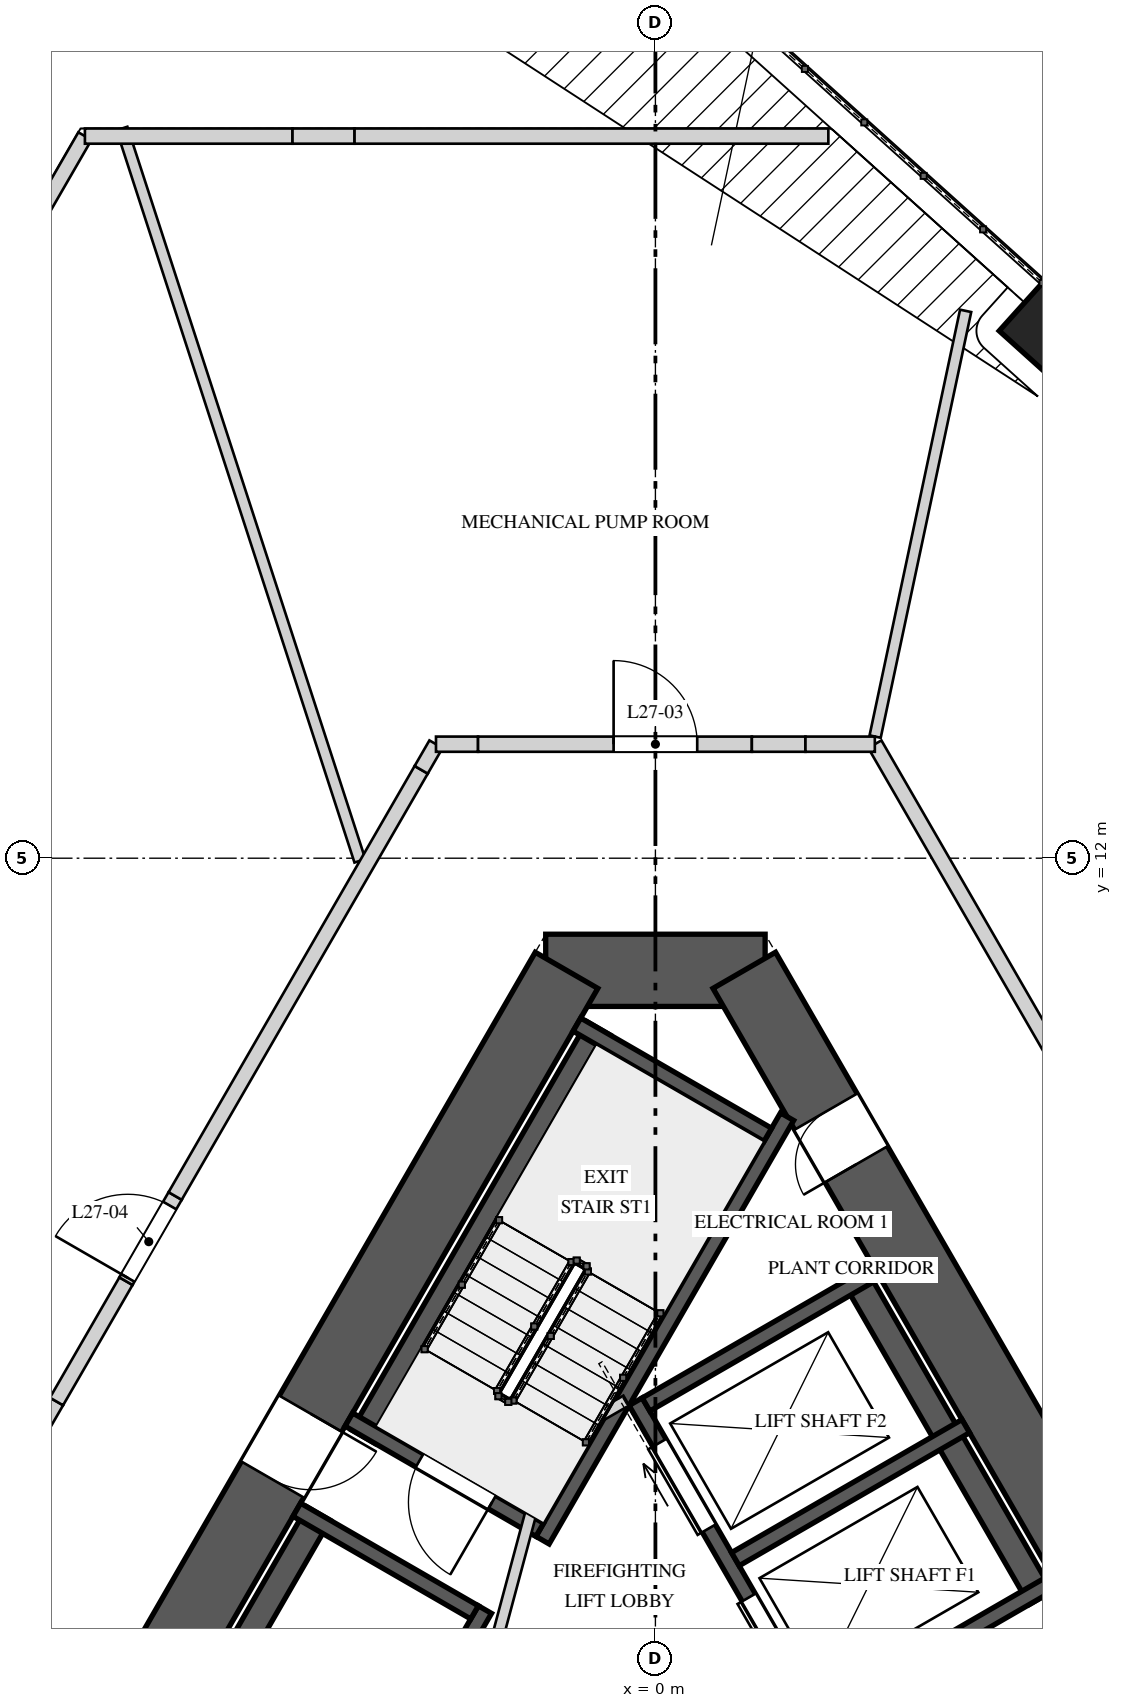
"""IFC4 building model, lengths in metres.
Left out: names, types, materials, properties, quantities, classifications, styles, units other than length and angle.
Written with IfcOpenShell. Run it as: python <this file> out.ifc"""

import sys

from ifc_helpers import new_model, si_unit, direction, frame, frame_2d, origin, origin_2d, place, context, subcontext, project, spatial, polyline, rectangle, outline, extrude, element, fill, save


model = new_model("IFC4")
c1 = context("Model", 3, precision=1e-05, world=origin(), true_north=direction((0.0, 1.0)))
c2 = subcontext(c1, "Body", "Model", "MODEL_VIEW")
j1 = project(units=[si_unit("LENGTHUNIT", "METRE"), si_unit("PLANEANGLEUNIT", "RADIAN")], contexts=[c1])
p1 = place(None, origin())
s1 = spatial("IfcSite", under=j1, at=p1, CompositionType="ELEMENT")
p2 = place(p1, origin())
s2 = spatial("IfcBuilding", under=s1, at=p2, CompositionType="ELEMENT")
p3 = place(p2, frame((0.0, 0.0, 120.4)))
s3 = spatial("IfcBuildingStorey", under=s2, at=p3, CompositionType="ELEMENT", Elevation=120.4)
p4 = place(p3, frame((1.443, 10.525, 0.0), z_axis=(0.0, 0.0, 1.0), x_axis=(-1.0, 0.0, 0.0)))
e1 = element("IfcWall", 1, at=p4, inside=s3, PredefinedType="SHEAR", context=c2, shape_type="SweptSolid", body=[
    extrude(rectangle(XDim=2.887, YDim=0.95, at=frame_2d((1.443, 0.0))), origin(), (0.0, 0.0, 1.0), 5.2),
])
p5 = place(p3, frame((-1.169, 10.525, 0.0), z_axis=(0.0, 0.0, 1.0), x_axis=(-0.499999102847, -0.866025921755, 0.0)))
e2 = element("IfcWall", 2, at=p5, inside=s3, PredefinedType="SHEAR", context=c2, shape_type="SweptSolid", body=[
    extrude(rectangle(XDim=17.061, YDim=0.95, at=frame_2d((8.53, 0.0))), origin(), (0.0, 0.0, 1.0), 5.2),
])
p6 = place(p5, frame((6.735, 0.0, 0.0)))
e3 = element("IfcOpeningElement", 3, at=p6, cuts=e2, PredefinedType="OPENING", context=c2, shape_type="SweptSolid", body=[
    extrude(rectangle(XDim=1.0, YDim=2.4, at=frame_2d((0.5, 1.2))), frame((0.0, 0.485, 0.0), z_axis=(0.0, -1.0, 0.0), x_axis=(1.0, 0.0, 0.0)), (0.0, 0.0, 1.0), 0.97),
])
p7 = place(p3, frame((9.699, -4.25, 0.0), z_axis=(0.0, 0.0, 1.0), x_axis=(-0.499999102847, 0.866025921755, 0.0)))
e4 = element("IfcWall", 4, at=p7, inside=s3, PredefinedType="SHEAR", context=c2, shape_type="SweptSolid", body=[
    extrude(rectangle(XDim=17.061, YDim=0.95, at=frame_2d((8.53, 0.0))), origin(), (0.0, 0.0, 1.0), 5.2),
])
p8 = place(p7, frame((6.805, 0.0, 0.0)))
e5 = element("IfcOpeningElement", 5, at=p8, cuts=e4, PredefinedType="OPENING", context=c2, shape_type="SweptSolid", body=[
    extrude(rectangle(XDim=1.0, YDim=2.4, at=frame_2d((0.5, 1.2))), frame((0.0, 0.485, 0.0), z_axis=(0.0, -1.0, 0.0), x_axis=(1.0, 0.0, 0.0)), (0.0, 0.0, 1.0), 0.97),
])
p9 = place(p7, frame((14.114, 0.0, 0.0)))
e6 = element("IfcOpeningElement", 6, at=p9, cuts=e4, PredefinedType="OPENING", context=c2, shape_type="SweptSolid", body=[
    extrude(rectangle(XDim=0.8, YDim=2.1, at=frame_2d((0.4, 1.05))), frame((0.0, 0.485, 0.0), z_axis=(0.0, -1.0, 0.0), x_axis=(1.0, 0.0, 0.0)), (0.0, 0.0, 1.0), 0.97),
])
p10 = place(p3, frame((5.307, 18.837, 0.0), z_axis=(0.0, 0.0, 1.0), x_axis=(-0.743144825477, 0.669130606359, 0.0)))
e7 = element("IfcColumn", 7, at=p10, inside=s3, PredefinedType="COLUMN", context=c2, shape_type="SweptSolid", body=[
    extrude(rectangle(XDim=1.3, YDim=0.9, at=origin_2d()), origin(), (0.0, 0.0, 1.0), 2.864),
])
p11 = place(p3, frame((-0.745, 9.76, 0.0), z_axis=(0.0, 0.0, 1.0), x_axis=(-0.49998037582, -0.866036733513, 0.0)))
e8 = element("IfcWall", 8, at=p11, inside=s3, PredefinedType="SOLIDWALL", context=c2, shape_type="SweptSolid", body=[
    extrude(rectangle(XDim=6.2, YDim=0.35, at=frame_2d((3.1, 0.0))), origin(), (0.0, 0.0, 1.0), 4.85),
])
p12 = place(p3, frame((1.732, 8.6, 0.0), z_axis=(0.0, 0.0, 1.0), x_axis=(-0.499975376872, -0.866039619487, 0.0)))
e9 = element("IfcWall", 9, at=p12, inside=s3, PredefinedType="SOLIDWALL", context=c2, shape_type="SweptSolid", body=[
    extrude(rectangle(XDim=6.434, YDim=0.2, at=frame_2d((3.217, 0.0))), origin(), (0.0, 0.0, 1.0), 4.85),
])
p13 = place(p3, frame((1.479, 8.361, 0.0), z_axis=(0.0, 0.0, 1.0), x_axis=(-0.866032775405, 0.499987231761, 0.0)))
e10 = element("IfcWall", 10, at=p13, inside=s3, PredefinedType="SOLIDWALL", context=c2, shape_type="SweptSolid", body=[
    extrude(rectangle(XDim=2.9, YDim=0.2, at=frame_2d((1.45, 0.0))), origin(), (0.0, 0.0, 1.0), 4.85),
])
p14 = place(p3, frame((-1.521, 3.165, 0.0), z_axis=(0.0, 0.0, 1.0), x_axis=(-0.866032775405, 0.499987231761, 0.0)))
e11 = element("IfcWall", 11, at=p14, inside=s3, PredefinedType="SOLIDWALL", context=c2, shape_type="SweptSolid", body=[
    extrude(rectangle(XDim=2.9, YDim=0.2, at=frame_2d((1.45, 0.0))), origin(), (0.0, 0.0, 1.0), 4.85),
])
p15 = place(p14, frame((0.725, 0.0, 0.0)))
e12 = element("IfcOpeningElement", 12, at=p15, cuts=e11, PredefinedType="OPENING", context=c2, shape_type="SweptSolid", body=[
    extrude(rectangle(XDim=1.1, YDim=2.4, at=frame_2d((0.55, 1.2))), frame((0.0, 0.11, 0.0), z_axis=(0.0, -1.0, 0.0), x_axis=(1.0, 0.0, 0.0)), (0.0, 0.0, 1.0), 0.22),
])
p16 = place(p3, frame((-2.243, 2.115, 0.0), z_axis=(0.0, 0.0, 1.0), x_axis=(-0.499996545922, -0.866027397988, 0.0)))
e13 = element("IfcWall", 13, at=p16, inside=s3, PredefinedType="SOLIDWALL", context=c2, shape_type="SweptSolid", body=[
    extrude(rectangle(XDim=5.5, YDim=0.2, at=frame_2d((2.75, 0.0))), origin(), (0.0, 0.0, 1.0), 4.85),
])
p17 = place(p3, frame((-4.43, 3.377, 0.0), z_axis=(0.0, 0.0, 1.0), x_axis=(-0.499996545922, -0.866027397988, 0.0)))
e14 = element("IfcWall", 14, at=p17, inside=s3, PredefinedType="SOLIDWALL", context=c2, shape_type="SweptSolid", body=[
    extrude(rectangle(XDim=5.5, YDim=0.35, at=frame_2d((2.75, 0.0))), origin(), (0.0, 0.0, 1.0), 4.85),
])
p18 = place(p3, frame((-2.38, 2.078, 0.0), z_axis=(0.0, 0.0, 1.0), x_axis=(-0.866059108428, 0.4999416173, 0.0)))
e15 = element("IfcWall", 15, at=p18, inside=s3, PredefinedType="SOLIDWALL", context=c2, shape_type="SweptSolid", body=[
    extrude(rectangle(XDim=2.7, YDim=0.2, at=frame_2d((1.35, 0.0))), origin(), (0.0, 0.0, 1.0), 4.85),
])
p19 = place(p3, frame((2.19, 0.606, 0.0), z_axis=(0.0, 0.0, 1.0), x_axis=(-0.500002801628, 0.866023786258, 0.0)))
e16 = element("IfcWall", 16, at=p19, inside=s3, PredefinedType="SOLIDWALL", context=c2, shape_type="SweptSolid", body=[
    extrude(rectangle(XDim=4.9, YDim=0.2, at=frame_2d((2.45, 0.0))), origin(), (0.0, 0.0, 1.0), 4.85),
])
p20 = place(p19, frame((0.625, 0.0, 0.0)))
e17 = element("IfcOpeningElement", 17, at=p20, cuts=e16, PredefinedType="OPENING", context=c2, shape_type="SweptSolid", body=[
    extrude(rectangle(XDim=1.3, YDim=2.1, at=frame_2d((0.65, 1.05))), frame((0.0, 0.11, 0.0), z_axis=(0.0, -1.0, 0.0), x_axis=(1.0, 0.0, 0.0)), (0.0, 0.0, 1.0), 0.22),
])
p21 = place(p19, frame((2.975, 0.0, 0.0)))
e18 = element("IfcOpeningElement", 18, at=p21, cuts=e16, PredefinedType="OPENING", context=c2, shape_type="SweptSolid", body=[
    extrude(rectangle(XDim=1.3, YDim=2.1, at=frame_2d((0.65, 1.05))), frame((0.0, 0.11, 0.0), z_axis=(0.0, -1.0, 0.0), x_axis=(1.0, 0.0, 0.0)), (0.0, 0.0, 1.0), 0.22),
])
p22 = place(p3, frame((5.07, 2.269, 0.0), z_axis=(0.0, 0.0, 1.0), x_axis=(-0.49998122708, 0.866036242063, 0.0)))
e19 = element("IfcWall", 19, at=p22, inside=s3, PredefinedType="SOLIDWALL", context=c2, shape_type="SweptSolid", body=[
    extrude(rectangle(XDim=4.9, YDim=0.35, at=frame_2d((2.45, 0.0))), origin(), (0.0, 0.0, 1.0), 4.85),
])
for number, where, z_axis, x_axis in (
    (20, (2.227, 0.743, 0.0), (0.0, 0.0, 1.0), (0.866, 0.5, 0.0)),
    (21, (1.052, 2.778, 0.0), (0.0, 0.0, 1.0), (0.866, 0.5, 0.0)),
):
    element("IfcWall", number, at=place(p3, frame(where, z_axis=z_axis, x_axis=x_axis)), inside=s3, PredefinedType="SOLIDWALL", context=c2, shape_type="SweptSolid", body=[
        extrude(rectangle(XDim=3.5, YDim=0.2, at=frame_2d((1.75, 0.0))), origin(), (0.0, 0.0, 1.0), 4.85),
    ])
p23 = place(p3, frame((-0.123, 4.813, 0.0), z_axis=(0.0, 0.0, 1.0), x_axis=(0.866019471182, 0.500010275428, 0.0)))
e22 = element("IfcWall", 22, at=p23, inside=s3, PredefinedType="SOLIDWALL", context=c2, shape_type="SweptSolid", body=[
    extrude(rectangle(XDim=3.5, YDim=0.2, at=frame_2d((1.75, 0.0))), origin(), (0.0, 0.0, 1.0), 4.85),
])
p24 = place(p3, frame((-2.178, 1.372, 0.0), z_axis=(0.0, 0.0, 1.0), x_axis=(0.258808958833, 0.96592852884, 0.0)))
e23 = element("IfcWall", 23, at=p24, inside=s3, PredefinedType="PARTITIONING", context=c2, shape_type="SweptSolid", body=[
    extrude(rectangle(XDim=2.903, YDim=0.15, at=frame_2d((1.451, 0.0))), origin(), (0.0, 0.0, 1.0), 4.85),
])
p25 = place(p3, frame((-1.51, 4.215, 0.0), z_axis=(0.0, 0.0, 1.0), x_axis=(0.866085525409, 0.49989585183, 0.0)))
e24 = element("IfcWall", 24, at=p25, inside=s3, PredefinedType="PARTITIONING", context=c2, shape_type="SweptSolid", body=[
    extrude(rectangle(XDim=1.3, YDim=0.15, at=frame_2d((0.65, 0.0))), origin(), (0.0, 0.0, 1.0), 4.85),
])
p26 = place(p3, frame((-3.888, 11.966, 0.0), z_axis=(0.0, 0.0, 1.0), x_axis=(-0.309017407409, 0.951056382092, 0.0)))
e25 = element("IfcWall", 25, at=p26, inside=s3, PredefinedType="PARTITIONING", context=c2, shape_type="SweptSolid", body=[
    extrude(rectangle(XDim=10.13, YDim=0.15, at=frame_2d((5.065, 0.0))), origin(), (0.0, 0.0, 1.0), 4.85),
])
p27 = place(p3, frame((2.891, 13.6, 0.0), z_axis=(0.0, 0.0, 1.0), x_axis=(0.207901080915, 0.978149855878, 0.0)))
e26 = element("IfcWall", 26, at=p27, inside=s3, PredefinedType="PARTITIONING", context=c2, shape_type="SweptSolid", body=[
    extrude(rectangle(XDim=5.726, YDim=0.15, at=frame_2d((2.863, 0.0))), origin(), (0.0, 0.0, 1.0), 4.85),
])
p28 = place(p3, frame((2.887, 13.5, 0.0), z_axis=(0.0, 0.0, 1.0), x_axis=(0.50000466804, -0.866022708674, 0.0)))
e27 = element("IfcWall", 27, at=p28, inside=s3, PredefinedType="SOLIDWALL", context=c2, shape_type="SweptSolid", body=[
    extrude(rectangle(XDim=5.142, YDim=0.2, at=frame_2d((2.571, 0.0))), origin(), (0.0, 0.0, 1.0), 4.85),
])
p29 = place(p3, frame((-8.279, 4.16, 0.0), z_axis=(0.0, 0.0, 1.0), x_axis=(0.500109828528, 0.865961984968, 0.0)))
e28 = element("IfcWall", 28, at=p29, inside=s3, PredefinedType="SOLIDWALL", context=c2, shape_type="SweptSolid", body=[
    extrude(rectangle(XDim=0.8, YDim=0.2, at=frame_2d((0.4, 0.0))), origin(), (0.0, 0.0, 1.0), 3.95),
])
p30 = place(p3, frame((-7.879, 4.853, 0.0), z_axis=(0.0, 0.0, 1.0), x_axis=(0.499961475795, 0.866047644602, 0.0)))
e29 = element("IfcWall", 29, at=p30, inside=s3, PredefinedType="SOLIDWALL", context=c2, shape_type="SweptSolid", body=[
    extrude(rectangle(XDim=1.827, YDim=0.2, at=frame_2d((0.914, 0.0))), origin(), (0.0, 0.0, 1.0), 4.85),
])
p31 = place(p3, frame((-6.966, 6.435, 0.0), z_axis=(0.0, 0.0, 1.0), x_axis=(0.500054453378, 0.865993962829, 0.0)))
e30 = element("IfcWall", 30, at=p31, inside=s3, PredefinedType="SOLIDWALL", context=c2, shape_type="SweptSolid", body=[
    extrude(outline(polyline([(0.0, 0.0), (1.294, 0.0), (1.294, 3.75), (0.351, 3.75), (0.351, 4.85), (0.0, 4.85), (0.0, 0.0)])), frame((0.0, 0.1, 0.0), z_axis=(0.0, -1.0, 0.0), x_axis=(1.0, 0.0, 0.0)), (0.0, 0.0, 1.0), 0.2),
])
p32 = place(p31, frame((0.05, 0.0, 0.0)))
e31 = element("IfcOpeningElement", 31, at=p32, cuts=e30, PredefinedType="OPENING", context=c2, shape_type="SweptSolid", body=[
    extrude(rectangle(XDim=1.1, YDim=2.2, at=frame_2d((0.55, 1.1))), frame((0.0, 0.11, 0.0), z_axis=(0.0, -1.0, 0.0), x_axis=(1.0, 0.0, 0.0)), (0.0, 0.0, 1.0), 0.22),
])
p33 = place(p3, frame((-6.318, 7.556, 0.0), z_axis=(0.0, 0.0, 1.0), x_axis=(0.500004272639, 0.866022936961, 0.0)))
e32 = element("IfcWall", 32, at=p33, inside=s3, PredefinedType="SOLIDWALL", context=c2, shape_type="SweptSolid", body=[
    extrude(rectangle(XDim=6.474, YDim=0.2, at=frame_2d((3.237, 0.0))), origin(), (0.0, 0.0, 1.0), 4.85),
])
p34 = place(p3, frame((-3.081, 13.163, 0.0), z_axis=(0.0, 0.0, 1.0), x_axis=(0.499849133735, 0.866112488944, 0.0)))
e33 = element("IfcWall", 33, at=p34, inside=s3, PredefinedType="SOLIDWALL", context=c2, shape_type="SweptSolid", body=[
    extrude(rectangle(XDim=0.389, YDim=0.2, at=frame_2d((0.195, 0.0))), origin(), (0.0, 0.0, 1.0), 3.95),
])
p35 = place(p3, frame((-2.887, 13.5, 0.0), z_axis=(0.0, 0.0, 1.0), x_axis=(1.0, 0.0, 0.0)))
e34 = element("IfcWall", 34, at=p35, inside=s3, PredefinedType="SOLIDWALL", context=c2, shape_type="SweptSolid", body=[
    extrude(rectangle(XDim=0.553, YDim=0.2, at=frame_2d((0.277, 0.0))), origin(), (0.0, 0.0, 1.0), 3.95),
])
p36 = place(p3, frame((-2.333, 13.5, 0.0), z_axis=(0.0, 0.0, 1.0), x_axis=(1.0, 0.0, 0.0)))
e35 = element("IfcWall", 35, at=p36, inside=s3, PredefinedType="SOLIDWALL", context=c2, shape_type="SweptSolid", body=[
    extrude(rectangle(XDim=3.603, YDim=0.2, at=frame_2d((1.801, 0.0))), origin(), (0.0, 0.0, 1.0), 4.85),
])
p37 = place(p36, frame((1.783, 0.0, 0.0)))
e36 = element("IfcOpeningElement", 36, at=p37, cuts=e35, PredefinedType="OPENING", context=c2, shape_type="SweptSolid", body=[
    extrude(rectangle(XDim=1.1, YDim=2.2, at=frame_2d((0.55, 1.1))), frame((0.0, 0.11, 0.0), z_axis=(0.0, -1.0, 0.0), x_axis=(1.0, 0.0, 0.0)), (0.0, 0.0, 1.0), 0.22),
])
p38 = place(p3, frame((1.269, 13.5, 0.0), z_axis=(0.0, 0.0, 1.0), x_axis=(1.0, 0.0, 0.0)))
e37 = element("IfcWall", 37, at=p38, inside=s3, PredefinedType="SOLIDWALL", context=c2, shape_type="SweptSolid", body=[
    extrude(rectangle(XDim=0.705, YDim=0.2, at=frame_2d((0.353, 0.0))), origin(), (0.0, 0.0, 1.0), 4.15),
])
p39 = place(p3, frame((1.974, 13.5, 0.0), z_axis=(0.0, 0.0, 1.0), x_axis=(1.0, 0.0, 0.0)))
e38 = element("IfcWall", 38, at=p39, inside=s3, PredefinedType="SOLIDWALL", context=c2, shape_type="SweptSolid", body=[
    extrude(rectangle(XDim=0.913, YDim=0.2, at=frame_2d((0.457, 0.0))), origin(), (0.0, 0.0, 1.0), 4.85),
])
p40 = place(p3, frame((-11.561, 14.475, 0.0), z_axis=(0.0, 0.0, 1.0), x_axis=(0.49999775851, 0.866026697905, 0.0)))
e39 = element("IfcWall", 39, at=p40, inside=s3, PredefinedType="SOLIDWALL", context=c2, shape_type="SweptSolid", body=[
    extrude(rectangle(XDim=8.111, YDim=0.2, at=frame_2d((4.056, 0.0))), origin(), (0.0, 0.0, 1.0), 4.85),
])
p41 = place(p3, frame((-7.506, 21.5, 0.0), z_axis=(0.0, 0.0, 1.0), x_axis=(1.0, 0.0, 0.0)))
e40 = element("IfcWall", 40, at=p41, inside=s3, PredefinedType="SOLIDWALL", context=c2, shape_type="SweptSolid", body=[
    extrude(rectangle(XDim=2.731, YDim=0.2, at=frame_2d((1.366, 0.0))), origin(), (0.0, 0.0, 1.0), 4.85),
])
p42 = place(p3, frame((-4.774, 21.5, 0.0), z_axis=(0.0, 0.0, 1.0), x_axis=(1.0, 0.0, 0.0)))
e41 = element("IfcWall", 41, at=p42, inside=s3, PredefinedType="SOLIDWALL", context=c2, shape_type="SweptSolid", body=[
    extrude(rectangle(XDim=0.816, YDim=0.2, at=frame_2d((0.408, 0.0))), origin(), (0.0, 0.0, 1.0), 3.95),
])
p43 = place(p3, frame((-3.958, 21.5, 0.0), z_axis=(0.0, 0.0, 1.0), x_axis=(1.0, 0.0, 0.0)))
e42 = element("IfcWall", 42, at=p43, inside=s3, PredefinedType="SOLIDWALL", context=c2, shape_type="SweptSolid", body=[
    extrude(rectangle(XDim=6.233, YDim=0.2, at=frame_2d((3.117, 0.0))), origin(), (0.0, 0.0, 1.0), 4.85),
])
p44 = place(p15, origin())
e43 = element("IfcDoor", 43, at=p44, inside=s3, OperationType="SINGLE_SWING_RIGHT", PredefinedType="DOOR", context=c2, shape_type="SweptSolid", body=[
    extrude(rectangle(XDim=1.1, YDim=2.4, at=frame_2d((0.55, 1.2))), frame((0.0, 0.025, 0.0), z_axis=(0.0, -1.0, 0.0), x_axis=(1.0, 0.0, 0.0)), (0.0, 0.0, 1.0), 0.05),
])
fill(e12, e43)
p45 = place(p20, origin())
e44 = element("IfcDoor", 44, at=p45, inside=s3, OperationType="SLIDING_TO_LEFT", PredefinedType="DOOR", context=c2, shape_type="SweptSolid", body=[
    extrude(rectangle(XDim=1.3, YDim=2.1, at=frame_2d((0.65, 1.05))), frame((0.0, 0.025, 0.0), z_axis=(0.0, -1.0, 0.0), x_axis=(1.0, 0.0, 0.0)), (0.0, 0.0, 1.0), 0.05),
])
fill(e17, e44)
p46 = place(p21, origin())
e45 = element("IfcDoor", 45, at=p46, inside=s3, OperationType="SLIDING_TO_RIGHT", PredefinedType="DOOR", context=c2, shape_type="SweptSolid", body=[
    extrude(rectangle(XDim=1.3, YDim=2.1, at=frame_2d((0.65, 1.05))), frame((0.0, 0.025, 0.0), z_axis=(0.0, -1.0, 0.0), x_axis=(1.0, 0.0, 0.0)), (0.0, 0.0, 1.0), 0.05),
])
fill(e18, e45)
p47 = place(p6, origin())
e46 = element("IfcDoor", 46, at=p47, inside=s3, OperationType="SINGLE_SWING_RIGHT", PredefinedType="DOOR", context=c2, shape_type="SweptSolid", body=[
    extrude(rectangle(XDim=1.0, YDim=2.4, at=frame_2d((0.5, 1.2))), frame((0.0, 0.025, 0.0), z_axis=(0.0, -1.0, 0.0), x_axis=(1.0, 0.0, 0.0)), (0.0, 0.0, 1.0), 0.05),
])
fill(e3, e46)
p48 = place(p9, origin())
e47 = element("IfcDoor", 47, at=p48, inside=s3, OperationType="SINGLE_SWING_RIGHT", PredefinedType="DOOR", context=c2, shape_type="SweptSolid", body=[
    extrude(rectangle(XDim=0.8, YDim=2.1, at=frame_2d((0.4, 1.05))), frame((0.0, 0.025, 0.0), z_axis=(0.0, -1.0, 0.0), x_axis=(1.0, 0.0, 0.0)), (0.0, 0.0, 1.0), 0.05),
])
fill(e6, e47)
p49 = place(p37, origin())
e48 = element("IfcDoor", 48, at=p49, inside=s3, OperationType="SINGLE_SWING_LEFT", PredefinedType="DOOR", context=c2, shape_type="SweptSolid", body=[
    extrude(rectangle(XDim=1.1, YDim=2.2, at=frame_2d((0.55, 1.1))), frame((0.0, 0.025, 0.0), z_axis=(0.0, -1.0, 0.0), x_axis=(1.0, 0.0, 0.0)), (0.0, 0.0, 1.0), 0.05),
])
fill(e36, e48)
p50 = place(p32, origin())
e49 = element("IfcDoor", 49, at=p50, inside=s3, OperationType="SINGLE_SWING_RIGHT", PredefinedType="DOOR", context=c2, shape_type="SweptSolid", body=[
    extrude(rectangle(XDim=1.1, YDim=2.2, at=frame_2d((0.55, 1.1))), frame((0.0, 0.025, 0.0), z_axis=(0.0, -1.0, 0.0), x_axis=(1.0, 0.0, 0.0)), (0.0, 0.0, 1.0), 0.05),
])
fill(e31, e49)
save(model, sys.argv[1])
